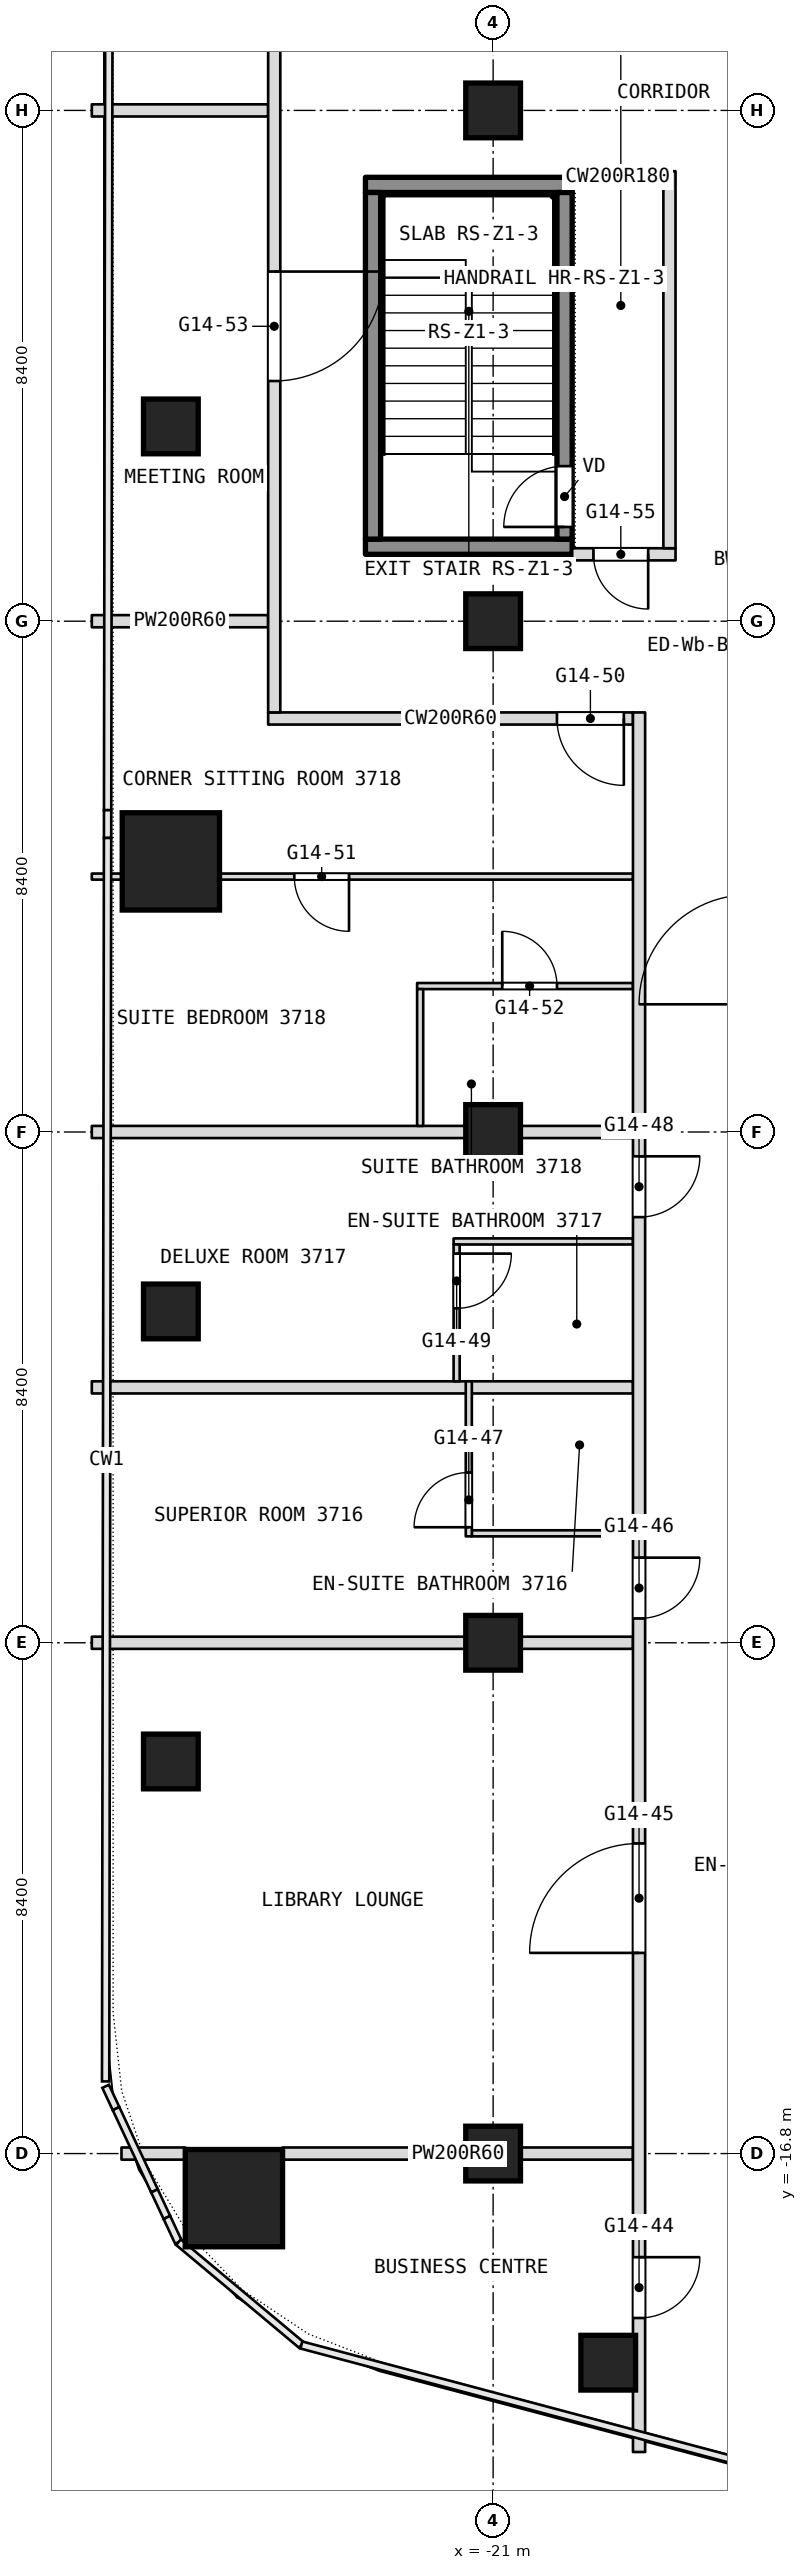
"""IFC4 building model, lengths in metres.
Left out: names, types, materials, properties, quantities, classifications, styles, units other than length and angle.
Written with IfcOpenShell. Run it as: python <this file> out.ifc"""

import sys

from ifc_helpers import new_model, si_unit, direction, frame, frame_2d, origin, origin_2d, place, context, subcontext, project, spatial, rectangle, extrude, element, fill, save


model = new_model("IFC4")
c1 = context("Model", 3, precision=1e-05, world=origin(), true_north=direction((0.0, 1.0)))
c2 = subcontext(c1, "Body", "Model", "MODEL_VIEW")
j1 = project(units=[si_unit("LENGTHUNIT", "METRE"), si_unit("PLANEANGLEUNIT", "RADIAN")], contexts=[c1])
p1 = place(None, origin())
s1 = spatial("IfcSite", under=j1, at=p1, CompositionType="ELEMENT")
p2 = place(p1, origin())
s2 = spatial("IfcBuilding", under=s1, at=p2, CompositionType="ELEMENT")
p3 = place(p2, frame((0.0, 0.0, 158.9)))
s3 = spatial("IfcBuildingStorey", under=s2, at=p3, CompositionType="ELEMENT", Elevation=158.9)
for number, where, z_axis, x_axis in (
    (1, (-25.263, -17.533, 0.0), (0.0, 0.0, 1.0), (1.0, 0.0, 0.0)),
    (2, (-26.3, 4.45, 0.0), (0.0, 0.0, 1.0), (1.0, 0.0, 0.0)),
):
    element("IfcColumn", number, at=place(p3, frame(where, z_axis=z_axis, x_axis=x_axis)), inside=s3, PredefinedType="COLUMN", context=c2, shape_type="SweptSolid", body=[
        extrude(rectangle(XDim=1.6, YDim=1.6, at=origin_2d()), origin(), (0.0, 0.0, 1.0), 3.6),
    ])
for number, where, z_axis, x_axis in (
    (3, (-21.0, -16.8, 0.0), (0.0, 0.0, 1.0), (1.0, 0.0, 0.0)),
    (4, (-21.0, -8.4, 0.0), (0.0, 0.0, 1.0), (1.0, 0.0, 0.0)),
    (5, (-21.0, 0.0, 0.0), (0.0, 0.0, 1.0), (1.0, 0.0, 0.0)),
    (6, (-21.0, 8.4, 0.0), (0.0, 0.0, 1.0), (1.0, 0.0, 0.0)),
    (7, (-21.0, 16.8, 0.0), (0.0, 0.0, 1.0), (1.0, 0.0, 0.0)),
    (8, (-26.3, -10.352, 0.0), (0.0, 0.0, 1.0), (1.0, 0.0, 0.0)),
    (9, (-26.3, -2.951, 0.0), (0.0, 0.0, 1.0), (1.0, 0.0, 0.0)),
    (10, (-26.3, 11.603, 0.0), (0.0, 0.0, 1.0), (1.0, 0.0, 0.0)),
    (11, (-19.107, -20.239, 0.0), (0.0, 0.0, 1.0), (1.0, 0.0, 0.0)),
):
    element("IfcColumn", number, at=place(p3, frame(where, z_axis=z_axis, x_axis=x_axis)), inside=s3, PredefinedType="COLUMN", context=c2, shape_type="SweptSolid", body=[
        extrude(rectangle(XDim=0.9, YDim=0.9, at=origin_2d()), origin(), (0.0, 0.0, 1.0), 3.6),
    ])
p4 = place(p3, frame((-27.112, -16.8, 0.0), z_axis=(0.0, 0.0, 1.0), x_axis=(1.0, 0.0, 0.0)))
e12 = element("IfcWall", 12, at=p4, inside=s3, PredefinedType="PARTITIONING", context=c2, shape_type="SweptSolid", body=[
    extrude(rectangle(XDim=1.049, YDim=0.2, at=frame_2d((0.524, 0.0))), origin(), (0.0, 0.0, 1.0), 3.34),
])
p5 = place(p3, frame((-24.463, -16.8, 0.0), z_axis=(0.0, 0.0, 1.0), x_axis=(1.0, 0.0, 0.0)))
e13 = element("IfcWall", 13, at=p5, inside=s3, PredefinedType="PARTITIONING", context=c2, shape_type="SweptSolid", body=[
    extrude(rectangle(XDim=5.763, YDim=0.2, at=frame_2d((2.881, 0.0))), origin(), (0.0, 0.0, 1.0), 2.89),
])
p6 = place(p3, frame((-27.6, -8.4, 0.0), z_axis=(0.0, 0.0, 1.0), x_axis=(1.0, 0.0, 0.0)))
e14 = element("IfcWall", 14, at=p6, inside=s3, PredefinedType="PARTITIONING", context=c2, shape_type="SweptSolid", body=[
    extrude(rectangle(XDim=8.9, YDim=0.2, at=frame_2d((4.45, 0.0))), origin(), (0.0, 0.0, 1.0), 2.89),
])
p7 = place(p3, frame((-21.35, -6.6, 0.0), z_axis=(0.0, 0.0, 1.0), x_axis=(1.0, 0.0, 0.0)))
e15 = element("IfcWall", 15, at=p7, inside=s3, PredefinedType="PARTITIONING", context=c2, shape_type="SweptSolid", body=[
    extrude(rectangle(XDim=2.65, YDim=0.1, at=frame_2d((1.325, 0.0))), origin(), (0.0, 0.0, 1.0), 3.34),
])
p8 = place(p3, frame((-27.6, -4.2, 0.0), z_axis=(0.0, 0.0, 1.0), x_axis=(1.0, 0.0, 0.0)))
e16 = element("IfcWall", 16, at=p8, inside=s3, PredefinedType="PARTITIONING", context=c2, shape_type="SweptSolid", body=[
    extrude(rectangle(XDim=8.9, YDim=0.2, at=frame_2d((4.45, 0.0))), origin(), (0.0, 0.0, 1.0), 3.34),
])
p9 = place(p3, frame((-21.65, -1.8, 0.0), z_axis=(0.0, 0.0, 1.0), x_axis=(1.0, 0.0, 0.0)))
e17 = element("IfcWall", 17, at=p9, inside=s3, PredefinedType="PARTITIONING", context=c2, shape_type="SweptSolid", body=[
    extrude(rectangle(XDim=2.95, YDim=0.1, at=frame_2d((1.475, 0.0))), origin(), (0.0, 0.0, 1.0), 3.34),
])
p10 = place(p3, frame((-27.6, 0.0, 0.0), z_axis=(0.0, 0.0, 1.0), x_axis=(1.0, 0.0, 0.0)))
e18 = element("IfcWall", 18, at=p10, inside=s3, PredefinedType="PARTITIONING", context=c2, shape_type="SweptSolid", body=[
    extrude(rectangle(XDim=8.9, YDim=0.2, at=frame_2d((4.45, 0.0))), origin(), (0.0, 0.0, 1.0), 2.89),
])
p11 = place(p3, frame((-22.25, 2.4, 0.0), z_axis=(0.0, 0.0, 1.0), x_axis=(1.0, 0.0, 0.0)))
e19 = element("IfcWall", 19, at=p11, inside=s3, PredefinedType="PARTITIONING", context=c2, shape_type="SweptSolid", body=[
    extrude(rectangle(XDim=3.55, YDim=0.1, at=frame_2d((1.775, 0.0))), origin(), (0.0, 0.0, 1.0), 3.34),
])
p12 = place(p11, frame((1.4, 0.0, 0.0)))
e20 = element("IfcOpeningElement", 20, at=p12, cuts=e19, PredefinedType="OPENING", context=c2, shape_type="SweptSolid", body=[
    extrude(rectangle(XDim=0.9, YDim=2.1, at=frame_2d((0.45, 1.05))), frame((0.0, 0.05, 0.0), z_axis=(0.0, -1.0, 0.0), x_axis=(1.0, 0.0, 0.0)), (0.0, 0.0, 1.0), 0.1),
])
p13 = place(p3, frame((-27.6, 4.2, 0.0), z_axis=(0.0, 0.0, 1.0), x_axis=(1.0, 0.0, 0.0)))
e21 = element("IfcWall", 21, at=p13, inside=s3, PredefinedType="PARTITIONING", context=c2, shape_type="SweptSolid", body=[
    extrude(rectangle(XDim=0.5, YDim=0.1, at=frame_2d((0.25, 0.0))), origin(), (0.0, 0.0, 1.0), 3.34),
])
p14 = place(p3, frame((-25.5, 4.2, 0.0), z_axis=(0.0, 0.0, 1.0), x_axis=(1.0, 0.0, 0.0)))
e22 = element("IfcWall", 22, at=p14, inside=s3, PredefinedType="PARTITIONING", context=c2, shape_type="SweptSolid", body=[
    extrude(rectangle(XDim=6.8, YDim=0.1, at=frame_2d((3.4, 0.0))), origin(), (0.0, 0.0, 1.0), 3.34),
])
p15 = place(p14, frame((1.23, 0.0, 0.0)))
e23 = element("IfcOpeningElement", 23, at=p15, cuts=e22, PredefinedType="OPENING", context=c2, shape_type="SweptSolid", body=[
    extrude(rectangle(XDim=0.9, YDim=2.1, at=frame_2d((0.45, 1.05))), frame((0.0, 0.05, 0.0), z_axis=(0.0, -1.0, 0.0), x_axis=(1.0, 0.0, 0.0)), (0.0, 0.0, 1.0), 0.1),
])
p16 = place(p3, frame((-24.7, 6.8, 0.0), z_axis=(0.0, 0.0, 1.0), x_axis=(1.0, 0.0, 0.0)))
e24 = element("IfcWall", 24, at=p16, inside=s3, PredefinedType="PARTITIONING", context=c2, shape_type="SweptSolid", body=[
    extrude(rectangle(XDim=6.0, YDim=0.2, at=frame_2d((3.0, 0.0))), origin(), (0.0, 0.0, 1.0), 3.34),
])
p17 = place(p16, frame((4.75, 0.0, 0.0)))
e25 = element("IfcOpeningElement", 25, at=p17, cuts=e24, PredefinedType="OPENING", context=c2, shape_type="SweptSolid", body=[
    extrude(rectangle(XDim=1.1, YDim=2.1, at=frame_2d((0.55, 1.05))), frame((0.0, 0.1, 0.0), z_axis=(0.0, -1.0, 0.0), x_axis=(1.0, 0.0, 0.0)), (0.0, 0.0, 1.0), 0.2),
])
p18 = place(p3, frame((-27.6, 8.4, 0.0), z_axis=(0.0, 0.0, 1.0), x_axis=(1.0, 0.0, 0.0)))
e26 = element("IfcWall", 26, at=p18, inside=s3, PredefinedType="PARTITIONING", context=c2, shape_type="SweptSolid", body=[
    extrude(rectangle(XDim=2.9, YDim=0.2, at=frame_2d((1.45, 0.0))), origin(), (0.0, 0.0, 1.0), 2.89),
])
p19 = place(p3, frame((-19.7, 9.5, 0.0), z_axis=(0.0, 0.0, 1.0), x_axis=(1.0, 0.0, 0.0)))
e27 = element("IfcWall", 27, at=p19, inside=s3, PredefinedType="PARTITIONING", context=c2, shape_type="SweptSolid", body=[
    extrude(rectangle(XDim=1.7, YDim=0.2, at=frame_2d((0.85, 0.0))), origin(), (0.0, 0.0, 1.0), 3.34),
])
p20 = place(p19, frame((0.35, 0.0, 0.0)))
e28 = element("IfcOpeningElement", 28, at=p20, cuts=e27, PredefinedType="OPENING", context=c2, shape_type="SweptSolid", body=[
    extrude(rectangle(XDim=0.9, YDim=2.1, at=frame_2d((0.45, 1.05))), frame((0.0, 0.1, 0.0), z_axis=(0.0, -1.0, 0.0), x_axis=(1.0, 0.0, 0.0)), (0.0, 0.0, 1.0), 0.2),
])
p21 = place(p3, frame((-19.7, 15.7, 0.0), z_axis=(0.0, 0.0, 1.0), x_axis=(1.0, 0.0, 0.0)))
e29 = element("IfcWall", 29, at=p21, inside=s3, PredefinedType="PARTITIONING", context=c2, shape_type="SweptSolid", body=[
    extrude(rectangle(XDim=1.5, YDim=0.2, at=frame_2d((0.75, 0.0))), origin(), (0.0, 0.0, 1.0), 3.34),
])
p22 = place(p3, frame((-27.6, 16.8, 0.0), z_axis=(0.0, 0.0, 1.0), x_axis=(1.0, 0.0, 0.0)))
e30 = element("IfcWall", 30, at=p22, inside=s3, PredefinedType="PARTITIONING", context=c2, shape_type="SweptSolid", body=[
    extrude(rectangle(XDim=2.9, YDim=0.2, at=frame_2d((1.45, 0.0))), origin(), (0.0, 0.0, 1.0), 2.89),
])
p23 = place(p3, frame((-18.1, 9.6, 0.0), z_axis=(0.0, 0.0, 1.0), x_axis=(0.0, 1.0, 0.0)))
e31 = element("IfcWall", 31, at=p23, inside=s3, PredefinedType="PARTITIONING", context=c2, shape_type="SweptSolid", body=[
    extrude(rectangle(XDim=6.2, YDim=0.2, at=frame_2d((3.1, 0.0))), origin(), (0.0, 0.0, 1.0), 3.34),
])
p24 = place(p3, frame((-18.6, -21.708, 0.0), z_axis=(0.0, 0.0, 1.0), x_axis=(0.0, 1.0, 0.0)))
e32 = element("IfcWall", 32, at=p24, inside=s3, PredefinedType="PARTITIONING", context=c2, shape_type="SweptSolid", body=[
    extrude(rectangle(XDim=28.608, YDim=0.2, at=frame_2d((14.304, 0.0))), origin(), (0.0, 0.0, 1.0), 3.34),
])
p25 = place(p24, frame((2.204, 0.0, 0.0)))
e33 = element("IfcOpeningElement", 33, at=p25, cuts=e32, PredefinedType="OPENING", context=c2, shape_type="SweptSolid", body=[
    extrude(rectangle(XDim=1.0, YDim=2.1, at=frame_2d((0.5, 1.05))), frame((0.0, 0.1, 0.0), z_axis=(0.0, -1.0, 0.0), x_axis=(1.0, 0.0, 0.0)), (0.0, 0.0, 1.0), 0.2),
])
p26 = place(p24, frame((8.208, 0.0, 0.0)))
e34 = element("IfcOpeningElement", 34, at=p26, cuts=e32, PredefinedType="OPENING", context=c2, shape_type="SweptSolid", body=[
    extrude(rectangle(XDim=1.8, YDim=2.1, at=frame_2d((0.9, 1.05))), frame((0.0, 0.1, 0.0), z_axis=(0.0, -1.0, 0.0), x_axis=(1.0, 0.0, 0.0)), (0.0, 0.0, 1.0), 0.2),
])
p27 = place(p24, frame((13.708, 0.0, 0.0)))
e35 = element("IfcOpeningElement", 35, at=p27, cuts=e32, PredefinedType="OPENING", context=c2, shape_type="SweptSolid", body=[
    extrude(rectangle(XDim=1.0, YDim=2.1, at=frame_2d((0.5, 1.05))), frame((0.0, 0.1, 0.0), z_axis=(0.0, -1.0, 0.0), x_axis=(1.0, 0.0, 0.0)), (0.0, 0.0, 1.0), 0.2),
])
p28 = place(p24, frame((20.308, 0.0, 0.0)))
e36 = element("IfcOpeningElement", 36, at=p28, cuts=e32, PredefinedType="OPENING", context=c2, shape_type="SweptSolid", body=[
    extrude(rectangle(XDim=1.0, YDim=2.1, at=frame_2d((0.5, 1.05))), frame((0.0, 0.1, 0.0), z_axis=(0.0, -1.0, 0.0), x_axis=(1.0, 0.0, 0.0)), (0.0, 0.0, 1.0), 0.2),
])
p29 = place(p3, frame((-21.4, -6.65, 0.0), z_axis=(0.0, 0.0, 1.0), x_axis=(0.0, 1.0, 0.0)))
e37 = element("IfcWall", 37, at=p29, inside=s3, PredefinedType="PARTITIONING", context=c2, shape_type="SweptSolid", body=[
    extrude(rectangle(XDim=2.55, YDim=0.1, at=frame_2d((1.275, 0.0))), origin(), (0.0, 0.0, 1.0), 3.34),
])
p30 = place(p29, frame((0.15, 0.0, 0.0)))
e38 = element("IfcOpeningElement", 38, at=p30, cuts=e37, PredefinedType="OPENING", context=c2, shape_type="SweptSolid", body=[
    extrude(rectangle(XDim=0.9, YDim=2.1, at=frame_2d((0.45, 1.05))), frame((0.0, 0.05, 0.0), z_axis=(0.0, -1.0, 0.0), x_axis=(1.0, 0.0, 0.0)), (0.0, 0.0, 1.0), 0.1),
])
p31 = place(p3, frame((-21.6, -4.1, 0.0), z_axis=(0.0, 0.0, 1.0), x_axis=(0.0, 1.0, 0.0)))
e39 = element("IfcWall", 39, at=p31, inside=s3, PredefinedType="PARTITIONING", context=c2, shape_type="SweptSolid", body=[
    extrude(rectangle(XDim=2.25, YDim=0.1, at=frame_2d((1.125, 0.0))), origin(), (0.0, 0.0, 1.0), 3.34),
])
p32 = place(p31, frame((1.2, 0.0, 0.0)))
e40 = element("IfcOpeningElement", 40, at=p32, cuts=e39, PredefinedType="OPENING", context=c2, shape_type="SweptSolid", body=[
    extrude(rectangle(XDim=0.9, YDim=2.1, at=frame_2d((0.45, 1.05))), frame((0.0, 0.05, 0.0), z_axis=(0.0, -1.0, 0.0), x_axis=(1.0, 0.0, 0.0)), (0.0, 0.0, 1.0), 0.1),
])
p33 = place(p3, frame((-22.2, 0.1, 0.0), z_axis=(0.0, 0.0, 1.0), x_axis=(0.0, 1.0, 0.0)))
e41 = element("IfcWall", 41, at=p33, inside=s3, PredefinedType="PARTITIONING", context=c2, shape_type="SweptSolid", body=[
    extrude(rectangle(XDim=2.25, YDim=0.1, at=frame_2d((1.125, 0.0))), origin(), (0.0, 0.0, 1.0), 3.34),
])
p34 = place(p3, frame((-24.6, 6.9, 0.0), z_axis=(0.0, 0.0, 1.0), x_axis=(0.0, 1.0, 0.0)))
e42 = element("IfcWall", 42, at=p34, inside=s3, PredefinedType="PARTITIONING", context=c2, shape_type="SweptSolid", body=[
    extrude(rectangle(XDim=11.6, YDim=0.2, at=frame_2d((5.8, 0.0))), origin(), (0.0, 0.0, 1.0), 3.34),
])
p35 = place(p34, frame((5.45, 0.0, 0.0)))
e43 = element("IfcOpeningElement", 43, at=p35, cuts=e42, PredefinedType="OPENING", context=c2, shape_type="SweptSolid", body=[
    extrude(rectangle(XDim=1.8, YDim=2.1, at=frame_2d((0.9, 1.05))), frame((0.0, 0.1, 0.0), z_axis=(0.0, -1.0, 0.0), x_axis=(1.0, 0.0, 0.0)), (0.0, 0.0, 1.0), 0.2),
])
for number, where, z_axis, x_axis in (
    (44, (-23.1, 9.625, 0.1), (0.0, 0.0, 1.0), (1.0, 0.0, 0.0)),
    (45, (-23.1, 15.575, 0.1), (0.0, 0.0, 1.0), (1.0, 0.0, 0.0)),
):
    element("IfcWall", number, at=place(p3, frame(where, z_axis=z_axis, x_axis=x_axis)), inside=s3, PredefinedType="SHEAR", context=c2, shape_type="SweptSolid", body=[
        extrude(rectangle(XDim=3.4, YDim=0.25, at=frame_2d((1.7, 0.0))), origin(), (0.0, 0.0, 1.0), 3.6),
    ])
p36 = place(p3, frame((-22.975, 9.75, 0.1), z_axis=(0.0, 0.0, 1.0), x_axis=(0.0, 1.0, 0.0)))
e46 = element("IfcWall", 46, at=p36, inside=s3, PredefinedType="SHEAR", context=c2, shape_type="SweptSolid", body=[
    extrude(rectangle(XDim=5.7, YDim=0.25, at=frame_2d((2.85, 0.0))), origin(), (0.0, 0.0, 1.0), 3.6),
])
p37 = place(p3, frame((-19.825, 9.75, 0.1), z_axis=(0.0, 0.0, 1.0), x_axis=(0.0, 1.0, 0.0)))
e47 = element("IfcWall", 47, at=p37, inside=s3, PredefinedType="SHEAR", context=c2, shape_type="SweptSolid", body=[
    extrude(rectangle(XDim=5.7, YDim=0.25, at=frame_2d((2.85, 0.0))), origin(), (0.0, 0.0, 1.0), 3.6),
])
p38 = place(p37, frame((0.2, 0.0, 0.0)))
e48 = element("IfcOpeningElement", 48, at=p38, cuts=e47, PredefinedType="OPENING", context=c2, shape_type="SweptSolid", body=[
    extrude(rectangle(XDim=1.0, YDim=2.1, at=frame_2d((0.5, 1.05))), frame((0.0, 0.125, 0.0), z_axis=(0.0, -1.0, 0.0), x_axis=(1.0, 0.0, 0.0)), (0.0, 0.0, 1.0), 0.25),
])
p39 = place(p12, origin())
e49 = element("IfcDoor", 49, at=p39, inside=s3, OperationType="SINGLE_SWING_LEFT", PredefinedType="DOOR", context=c2, shape_type="SweptSolid", body=[
    extrude(rectangle(XDim=0.9, YDim=2.1, at=frame_2d((0.45, 1.05))), frame((0.0, 0.025, 0.0), z_axis=(0.0, -1.0, 0.0), x_axis=(1.0, 0.0, 0.0)), (0.0, 0.0, 1.0), 0.05),
])
fill(e20, e49)
p40 = place(p15, origin())
e50 = element("IfcDoor", 50, at=p40, inside=s3, OperationType="SINGLE_SWING_RIGHT", PredefinedType="DOOR", context=c2, shape_type="SweptSolid", body=[
    extrude(rectangle(XDim=0.9, YDim=2.1, at=frame_2d((0.45, 1.05))), frame((0.0, 0.025, 0.0), z_axis=(0.0, -1.0, 0.0), x_axis=(1.0, 0.0, 0.0)), (0.0, 0.0, 1.0), 0.05),
])
fill(e23, e50)
p41 = place(p17, origin())
e51 = element("IfcDoor", 51, at=p41, inside=s3, OperationType="SINGLE_SWING_LEFT", PredefinedType="DOOR", context=c2, shape_type="SweptSolid", body=[
    extrude(rectangle(XDim=1.1, YDim=2.1, at=frame_2d((0.55, 1.05))), frame((0.0, 0.025, 0.0), z_axis=(0.0, -1.0, 0.0), x_axis=(1.0, 0.0, 0.0)), (0.0, 0.0, 1.0), 0.05),
])
fill(e25, e51)
p42 = place(p20, origin())
e52 = element("IfcDoor", 52, at=p42, inside=s3, OperationType="SINGLE_SWING_RIGHT", PredefinedType="DOOR", context=c2, shape_type="SweptSolid", body=[
    extrude(rectangle(XDim=0.9, YDim=2.1, at=frame_2d((0.45, 1.05))), frame((0.0, 0.025, 0.0), z_axis=(0.0, -1.0, 0.0), x_axis=(1.0, 0.0, 0.0)), (0.0, 0.0, 1.0), 0.05),
])
fill(e28, e52)
p43 = place(p25, origin())
e53 = element("IfcDoor", 53, at=p43, inside=s3, OperationType="SINGLE_SWING_RIGHT", PredefinedType="DOOR", context=c2, shape_type="SweptSolid", body=[
    extrude(rectangle(XDim=1.0, YDim=2.1, at=frame_2d((0.5, 1.05))), frame((0.0, 0.025, 0.0), z_axis=(0.0, -1.0, 0.0), x_axis=(1.0, 0.0, 0.0)), (0.0, 0.0, 1.0), 0.05),
])
fill(e33, e53)
p44 = place(p26, origin())
e54 = element("IfcDoor", 54, at=p44, inside=s3, OperationType="DOUBLE_DOOR_SINGLE_SWING", PredefinedType="DOOR", context=c2, shape_type="SweptSolid", body=[
    extrude(rectangle(XDim=1.8, YDim=2.1, at=frame_2d((0.9, 1.05))), frame((0.0, 0.025, 0.0), z_axis=(0.0, -1.0, 0.0), x_axis=(1.0, 0.0, 0.0)), (0.0, 0.0, 1.0), 0.05),
])
fill(e34, e54)
p45 = place(p27, origin())
e55 = element("IfcDoor", 55, at=p45, inside=s3, OperationType="SINGLE_SWING_LEFT", PredefinedType="DOOR", context=c2, shape_type="SweptSolid", body=[
    extrude(rectangle(XDim=1.0, YDim=2.1, at=frame_2d((0.5, 1.05))), frame((0.0, 0.025, 0.0), z_axis=(0.0, -1.0, 0.0), x_axis=(1.0, 0.0, 0.0)), (0.0, 0.0, 1.0), 0.05),
])
fill(e35, e55)
p46 = place(p28, origin())
e56 = element("IfcDoor", 56, at=p46, inside=s3, OperationType="SINGLE_SWING_LEFT", PredefinedType="DOOR", context=c2, shape_type="SweptSolid", body=[
    extrude(rectangle(XDim=1.0, YDim=2.1, at=frame_2d((0.5, 1.05))), frame((0.0, 0.025, 0.0), z_axis=(0.0, -1.0, 0.0), x_axis=(1.0, 0.0, 0.0)), (0.0, 0.0, 1.0), 0.05),
])
fill(e36, e56)
p47 = place(p30, origin())
e57 = element("IfcDoor", 57, at=p47, inside=s3, OperationType="SINGLE_SWING_RIGHT", PredefinedType="DOOR", context=c2, shape_type="SweptSolid", body=[
    extrude(rectangle(XDim=0.9, YDim=2.1, at=frame_2d((0.45, 1.05))), frame((0.0, 0.025, 0.0), z_axis=(0.0, -1.0, 0.0), x_axis=(1.0, 0.0, 0.0)), (0.0, 0.0, 1.0), 0.05),
])
fill(e38, e57)
p48 = place(p32, origin())
e58 = element("IfcDoor", 58, at=p48, inside=s3, OperationType="SINGLE_SWING_LEFT", PredefinedType="DOOR", context=c2, shape_type="SweptSolid", body=[
    extrude(rectangle(XDim=0.9, YDim=2.1, at=frame_2d((0.45, 1.05))), frame((0.0, 0.025, 0.0), z_axis=(0.0, -1.0, 0.0), x_axis=(1.0, 0.0, 0.0)), (0.0, 0.0, 1.0), 0.05),
])
fill(e40, e58)
p49 = place(p35, origin())
e59 = element("IfcDoor", 59, at=p49, inside=s3, OperationType="DOUBLE_DOOR_SINGLE_SWING", PredefinedType="DOOR", context=c2, shape_type="SweptSolid", body=[
    extrude(rectangle(XDim=1.8, YDim=2.1, at=frame_2d((0.9, 1.05))), frame((0.0, 0.025, 0.0), z_axis=(0.0, -1.0, 0.0), x_axis=(1.0, 0.0, 0.0)), (0.0, 0.0, 1.0), 0.05),
])
fill(e43, e59)
p50 = place(p38, origin())
e60 = element("IfcDoor", 60, at=p50, inside=s3, OperationType="SINGLE_SWING_LEFT", PredefinedType="DOOR", context=c2, shape_type="SweptSolid", body=[
    extrude(rectangle(XDim=1.0, YDim=2.1, at=frame_2d((0.5, 1.05))), frame((0.0, 0.025, 0.0), z_axis=(0.0, -1.0, 0.0), x_axis=(1.0, 0.0, 0.0)), (0.0, 0.0, 1.0), 0.05),
])
fill(e48, e60)
save(model, sys.argv[1])
